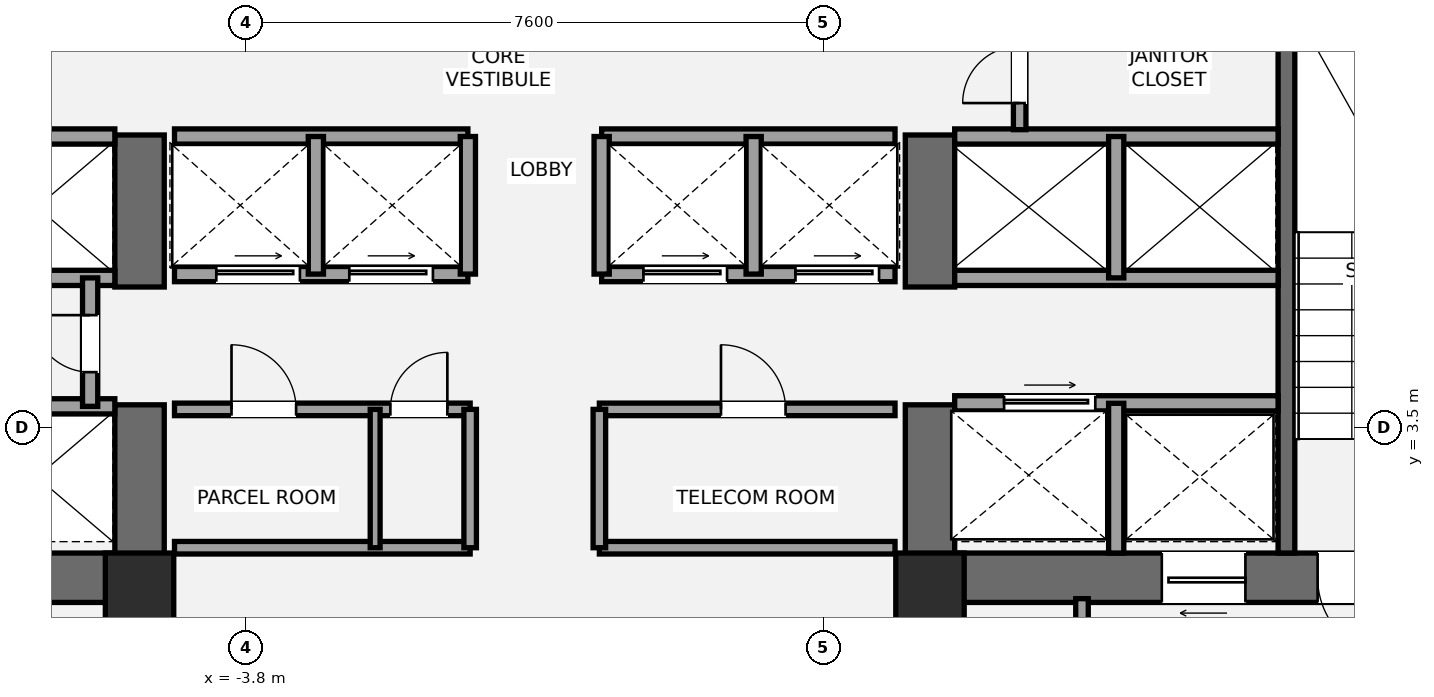
"""IFC4 building model, lengths in metres.
Left out: names, types, materials, properties, quantities, classifications, styles, units other than length and angle.
Written with IfcOpenShell. Run it as: python <this file> out.ifc"""

import sys

from ifc_helpers import new_model, si_unit, direction, frame, frame_2d, origin, origin_2d, place, context, subcontext, project, spatial, rectangle, extrude, element, fill, save


model = new_model("IFC4")
c1 = context("Model", 3, precision=1e-05, world=origin(), true_north=direction((0.0, 1.0)))
c2 = subcontext(c1, "Body", "Model", "MODEL_VIEW")
j1 = project(units=[si_unit("LENGTHUNIT", "METRE"), si_unit("PLANEANGLEUNIT", "RADIAN")], contexts=[c1])
p1 = place(None, origin())
s1 = spatial("IfcSite", under=j1, at=p1, CompositionType="ELEMENT")
p2 = place(p1, origin())
s2 = spatial("IfcBuilding", under=s1, at=p2, CompositionType="ELEMENT")
p3 = place(p2, frame((0.0, 0.0, 188.6)))
s3 = spatial("IfcBuildingStorey", under=s2, at=p3, CompositionType="ELEMENT", Elevation=188.6)
p4 = place(p3, frame((-4.875, 1.525, 0.0), z_axis=(0.0, 0.0, 1.0), x_axis=(-1.0, 0.0, 0.0)))
e1 = element("IfcWall", 1, at=p4, inside=s3, PredefinedType="SHEAR", context=c2, shape_type="SweptSolid", body=[
    extrude(rectangle(XDim=8.925, YDim=0.65, at=frame_2d((4.462, 0.0))), origin(), (0.0, 0.0, 1.0), 3.2),
])
p5 = place(p4, frame((5.425, 0.0, 0.0)))
e2 = element("IfcOpeningElement", 2, at=p5, cuts=e1, PredefinedType="OPENING", context=c2, shape_type="SweptSolid", body=[
    extrude(rectangle(XDim=1.05, YDim=2.15, at=frame_2d((0.525, 1.075))), frame((0.0, 0.335, 0.0), z_axis=(0.0, -1.0, 0.0), x_axis=(1.0, 0.0, 0.0)), (0.0, 0.0, 1.0), 0.67),
])
p6 = place(p4, frame((3.755, 0.0, 0.0)))
e3 = element("IfcOpeningElement", 3, at=p6, cuts=e1, PredefinedType="OPENING", context=c2, shape_type="SweptSolid", body=[
    extrude(rectangle(XDim=1.1, YDim=2.2, at=frame_2d((0.55, 1.1))), frame((0.0, 0.335, 0.0), z_axis=(0.0, -1.0, 0.0), x_axis=(1.0, 0.0, 0.0)), (0.0, 0.0, 1.0), 0.67),
])
p7 = place(p3, frame((-5.2, 1.2, 0.0), z_axis=(0.0, 0.0, 1.0), x_axis=(0.0, 1.0, 0.0)))
e4 = element("IfcWall", 4, at=p7, inside=s3, PredefinedType="SHEAR", context=c2, shape_type="SweptSolid", body=[
    extrude(rectangle(XDim=2.6, YDim=0.65, at=frame_2d((1.3, 0.0))), origin(), (0.0, 0.0, 1.0), 3.2),
])
p8 = place(p3, frame((-5.2, 5.35, 0.0), z_axis=(0.0, 0.0, 1.0), x_axis=(0.0, 1.0, 0.0)))
e5 = element("IfcWall", 5, at=p8, inside=s3, PredefinedType="SHEAR", context=c2, shape_type="SweptSolid", body=[
    extrude(rectangle(XDim=2.0, YDim=0.65, at=frame_2d((1.0, 0.0))), origin(), (0.0, 0.0, 1.0), 3.2),
])
p9 = place(p3, frame((13.8, 1.525, 0.0), z_axis=(0.0, 0.0, 1.0), x_axis=(-1.0, 0.0, 0.0)))
e6 = element("IfcWall", 6, at=p9, inside=s3, PredefinedType="SHEAR", context=c2, shape_type="SweptSolid", body=[
    extrude(rectangle(XDim=8.925, YDim=0.65, at=frame_2d((4.462, 0.0))), origin(), (0.0, 0.0, 1.0), 3.2),
])
p10 = place(p9, frame((2.45, 0.0, 0.0)))
e7 = element("IfcOpeningElement", 7, at=p10, cuts=e6, PredefinedType="OPENING", context=c2, shape_type="SweptSolid", body=[
    extrude(rectangle(XDim=1.05, YDim=2.15, at=frame_2d((0.525, 1.075))), frame((0.0, 0.335, 0.0), z_axis=(0.0, -1.0, 0.0), x_axis=(1.0, 0.0, 0.0)), (0.0, 0.0, 1.0), 0.67),
])
p11 = place(p9, frame((4.45, 0.0, 0.0)))
e8 = element("IfcOpeningElement", 8, at=p11, cuts=e6, PredefinedType="OPENING", context=c2, shape_type="SweptSolid", body=[
    extrude(rectangle(XDim=1.1, YDim=2.2, at=frame_2d((0.55, 1.1))), frame((0.0, 0.335, 0.0), z_axis=(0.0, -1.0, 0.0), x_axis=(1.0, 0.0, 0.0)), (0.0, 0.0, 1.0), 0.67),
])
p12 = place(p3, frame((5.2, 1.2, 0.0), z_axis=(0.0, 0.0, 1.0), x_axis=(0.0, 1.0, 0.0)))
e9 = element("IfcWall", 9, at=p12, inside=s3, PredefinedType="SHEAR", context=c2, shape_type="SweptSolid", body=[
    extrude(rectangle(XDim=2.6, YDim=0.65, at=frame_2d((1.3, 0.0))), origin(), (0.0, 0.0, 1.0), 3.2),
])
p13 = place(p3, frame((5.2, 5.35, 0.0), z_axis=(0.0, 0.0, 1.0), x_axis=(0.0, 1.0, 0.0)))
e10 = element("IfcWall", 10, at=p13, inside=s3, PredefinedType="SHEAR", context=c2, shape_type="SweptSolid", body=[
    extrude(rectangle(XDim=2.0, YDim=0.65, at=frame_2d((1.0, 0.0))), origin(), (0.0, 0.0, 1.0), 3.2),
])
p14 = place(p3, frame((9.89, 1.85, 0.0), z_axis=(0.0, 0.0, 1.0), x_axis=(0.0, 1.0, 0.0)))
e11 = element("IfcWall", 11, at=p14, inside=s3, PredefinedType="SHEAR", context=c2, shape_type="SweptSolid", body=[
    extrude(rectangle(XDim=7.15, YDim=0.22, at=frame_2d((3.575, 0.0))), origin(), (0.0, 0.0, 1.0), 3.2),
])
for number, where, z_axis, x_axis in (
    (12, (-5.2, 1.4, 0.0), (0.0, 0.0, 1.0), (1.0, 0.0, 0.0)),
    (13, (5.2, 1.4, 0.0), (0.0, 0.0, 1.0), (1.0, 0.0, 0.0)),
):
    element("IfcColumn", number, at=place(p3, frame(where, z_axis=z_axis, x_axis=x_axis)), inside=s3, PredefinedType="COLUMN", context=c2, shape_type="SweptSolid", body=[
        extrude(rectangle(XDim=0.9, YDim=0.9, at=origin_2d()), origin(), (0.0, 0.0, 1.0), 3.2),
    ])
p15 = place(p3, frame((-4.95, -2.15, 0.0), z_axis=(0.0, 0.0, 1.0), x_axis=(0.0, 1.0, 0.0)))
e14 = element("IfcWall", 14, at=p15, inside=s3, PredefinedType="SOLIDWALL", context=c2, shape_type="SweptSolid", body=[
    extrude(rectangle(XDim=3.4, YDim=0.2, at=frame_2d((1.7, 0.0))), origin(), (0.0, 0.0, 1.0), 2.473),
])
p16 = place(p15, frame((0.95, 0.0, 0.0)))
e15 = element("IfcOpeningElement", 15, at=p16, cuts=e14, PredefinedType="OPENING", context=c2, shape_type="SweptSolid", body=[
    extrude(rectangle(XDim=0.75, YDim=2.1, at=frame_2d((0.375, 1.05))), frame((0.0, 0.11, 0.0), z_axis=(0.0, -1.0, 0.0), x_axis=(1.0, 0.0, 0.0)), (0.0, 0.0, 1.0), 0.22),
])
p17 = place(p3, frame((7.2, -2.15, 0.0), z_axis=(0.0, 0.0, 1.0), x_axis=(0.0, 1.0, 0.0)))
e16 = element("IfcWall", 16, at=p17, inside=s3, PredefinedType="PARTITIONING", context=c2, shape_type="SweptSolid", body=[
    extrude(rectangle(XDim=3.4, YDim=0.165, at=frame_2d((1.7, 0.0))), origin(), (0.0, 0.0, 1.0), 2.473),
])
p18 = place(p3, frame((4.95, -2.15, 0.0), z_axis=(0.0, 0.0, 1.0), x_axis=(0.0, 1.0, 0.0)))
e17 = element("IfcWall", 17, at=p18, inside=s3, PredefinedType="SOLIDWALL", context=c2, shape_type="SweptSolid", body=[
    extrude(rectangle(XDim=3.4, YDim=0.2, at=frame_2d((1.7, 0.0))), origin(), (0.0, 0.0, 1.0), 2.473),
])
p19 = place(p18, frame((0.95, 0.0, 0.0)))
e18 = element("IfcOpeningElement", 18, at=p19, cuts=e17, PredefinedType="OPENING", context=c2, shape_type="SweptSolid", body=[
    extrude(rectangle(XDim=0.75, YDim=2.1, at=frame_2d((0.375, 1.05))), frame((0.0, 0.11, 0.0), z_axis=(0.0, -1.0, 0.0), x_axis=(1.0, 0.0, 0.0)), (0.0, 0.0, 1.0), 0.22),
])
for number, where, z_axis, x_axis in (
    (19, (-9.78, 3.78, 0.0), (0.0, 0.0, 1.0), (1.0, 0.0, 0.0)),
    (20, (-9.78, 5.47, 0.0), (0.0, 0.0, 1.0), (1.0, 0.0, 0.0)),
    (21, (-9.78, 7.33, 0.0), (0.0, 0.0, 1.0), (1.0, 0.0, 0.0)),
):
    element("IfcWall", number, at=place(p3, frame(where, z_axis=z_axis, x_axis=x_axis)), inside=s3, PredefinedType="SOLIDWALL", context=c2, shape_type="SweptSolid", body=[
        extrude(rectangle(XDim=4.255, YDim=0.2, at=frame_2d((2.127, 0.0))), origin(), (0.0, 0.0, 1.0), 3.02),
    ])
p20 = place(p3, frame((-5.85, 3.78, 0.0), z_axis=(0.0, 0.0, 1.0), x_axis=(0.0, 1.0, 0.0)))
e22 = element("IfcWall", 22, at=p20, inside=s3, PredefinedType="SOLIDWALL", context=c2, shape_type="SweptSolid", body=[
    extrude(rectangle(XDim=1.69, YDim=0.2, at=frame_2d((0.845, 0.0))), origin(), (0.0, 0.0, 1.0), 3.02),
])
p21 = place(p20, frame((0.45, 0.0, 0.0)))
e23 = element("IfcOpeningElement", 23, at=p21, cuts=e22, PredefinedType="OPENING", context=c2, shape_type="SweptSolid", body=[
    extrude(rectangle(XDim=0.75, YDim=2.1, at=frame_2d((0.375, 1.05))), frame((0.0, 0.11, 0.0), z_axis=(0.0, -1.0, 0.0), x_axis=(1.0, 0.0, 0.0)), (0.0, 0.0, 1.0), 0.22),
])
p22 = place(p3, frame((5.525, 3.82, 0.0), z_axis=(0.0, 0.0, 1.0), x_axis=(1.0, 0.0, 0.0)))
e24 = element("IfcWall", 24, at=p22, inside=s3, PredefinedType="SOLIDWALL", context=c2, shape_type="SweptSolid", body=[
    extrude(rectangle(XDim=4.255, YDim=0.2, at=frame_2d((2.127, 0.0))), origin(), (0.0, 0.0, 1.0), 3.02),
])
p23 = place(p22, frame((0.65, 0.0, 0.0)))
e25 = element("IfcOpeningElement", 25, at=p23, cuts=e24, PredefinedType="OPENING", context=c2, shape_type="SweptSolid", body=[
    extrude(rectangle(XDim=1.2, YDim=2.2, at=frame_2d((0.6, 1.1))), frame((0.0, 0.11, 0.0), z_axis=(0.0, -1.0, 0.0), x_axis=(1.0, 0.0, 0.0)), (0.0, 0.0, 1.0), 0.22),
])
p24 = place(p3, frame((7.65, 1.85, 0.0), z_axis=(0.0, 0.0, 1.0), x_axis=(0.0, 1.0, 0.0)))
e26 = element("IfcWall", 26, at=p24, inside=s3, PredefinedType="SOLIDWALL", context=c2, shape_type="SweptSolid", body=[
    extrude(rectangle(XDim=1.97, YDim=0.2, at=frame_2d((0.985, 0.0))), origin(), (0.0, 0.0, 1.0), 3.02),
])
for number, where, z_axis, x_axis in (
    (27, (5.525, 5.47, 0.0), (0.0, 0.0, 1.0), (1.0, 0.0, 0.0)),
    (28, (5.525, 7.33, 0.0), (0.0, 0.0, 1.0), (1.0, 0.0, 0.0)),
):
    element("IfcWall", number, at=place(p3, frame(where, z_axis=z_axis, x_axis=x_axis)), inside=s3, PredefinedType="SOLIDWALL", context=c2, shape_type="SweptSolid", body=[
        extrude(rectangle(XDim=4.255, YDim=0.2, at=frame_2d((2.127, 0.0))), origin(), (0.0, 0.0, 1.0), 3.02),
    ])
p25 = place(p3, frame((7.65, 5.47, 0.0), z_axis=(0.0, 0.0, 1.0), x_axis=(0.0, 1.0, 0.0)))
e29 = element("IfcWall", 29, at=p25, inside=s3, PredefinedType="SOLIDWALL", context=c2, shape_type="SweptSolid", body=[
    extrude(rectangle(XDim=1.86, YDim=0.2, at=frame_2d((0.93, 0.0))), origin(), (0.0, 0.0, 1.0), 3.02),
])
p26 = place(p3, frame((-4.74, 1.92, 0.0), z_axis=(0.0, 0.0, 1.0), x_axis=(1.0, 0.0, 0.0)))
e30 = element("IfcWall", 30, at=p26, inside=s3, PredefinedType="PARTITIONING", context=c2, shape_type="SweptSolid", body=[
    extrude(rectangle(XDim=3.89, YDim=0.165, at=frame_2d((1.945, 0.0))), origin(), (0.0, 0.0, 1.0), 2.16),
])
p27 = place(p3, frame((-4.74, 3.74, 0.0), z_axis=(0.0, 0.0, 1.0), x_axis=(1.0, 0.0, 0.0)))
e31 = element("IfcWall", 31, at=p27, inside=s3, PredefinedType="PARTITIONING", context=c2, shape_type="SweptSolid", body=[
    extrude(rectangle(XDim=3.89, YDim=0.165, at=frame_2d((1.945, 0.0))), origin(), (0.0, 0.0, 1.0), 3.02),
])
p28 = place(p27, frame((0.75, 0.0, 0.0)))
e32 = element("IfcOpeningElement", 32, at=p28, cuts=e31, PredefinedType="OPENING", context=c2, shape_type="SweptSolid", body=[
    extrude(rectangle(XDim=0.85, YDim=2.1, at=frame_2d((0.425, 1.05))), frame((0.0, 0.093, 0.0), z_axis=(0.0, -1.0, 0.0), x_axis=(1.0, 0.0, 0.0)), (0.0, 0.0, 1.0), 0.185),
])
p29 = place(p27, frame((2.84, 0.0, 0.0)))
e33 = element("IfcOpeningElement", 33, at=p29, cuts=e31, PredefinedType="OPENING", context=c2, shape_type="SweptSolid", body=[
    extrude(rectangle(XDim=0.75, YDim=2.1, at=frame_2d((0.375, 1.05))), frame((0.0, 0.093, 0.0), z_axis=(0.0, -1.0, 0.0), x_axis=(1.0, 0.0, 0.0)), (0.0, 0.0, 1.0), 0.185),
])
p30 = place(p3, frame((-0.85, 1.92, 0.0), z_axis=(0.0, 0.0, 1.0), x_axis=(0.0, 1.0, 0.0)))
e34 = element("IfcWall", 34, at=p30, inside=s3, PredefinedType="PARTITIONING", context=c2, shape_type="SweptSolid", body=[
    extrude(rectangle(XDim=1.82, YDim=0.165, at=frame_2d((0.91, 0.0))), origin(), (0.0, 0.0, 1.0), 3.02),
])
p31 = place(p3, frame((0.85, 1.92, 0.0), z_axis=(0.0, 0.0, 1.0), x_axis=(1.0, 0.0, 0.0)))
e35 = element("IfcWall", 35, at=p31, inside=s3, PredefinedType="PARTITIONING", context=c2, shape_type="SweptSolid", body=[
    extrude(rectangle(XDim=3.89, YDim=0.165, at=frame_2d((1.945, 0.0))), origin(), (0.0, 0.0, 1.0), 2.16),
])
p32 = place(p3, frame((0.85, 3.74, 0.0), z_axis=(0.0, 0.0, 1.0), x_axis=(1.0, 0.0, 0.0)))
e36 = element("IfcWall", 36, at=p32, inside=s3, PredefinedType="PARTITIONING", context=c2, shape_type="SweptSolid", body=[
    extrude(rectangle(XDim=3.89, YDim=0.165, at=frame_2d((1.945, 0.0))), origin(), (0.0, 0.0, 1.0), 3.02),
])
p33 = place(p32, frame((1.6, 0.0, 0.0)))
e37 = element("IfcOpeningElement", 37, at=p33, cuts=e36, PredefinedType="OPENING", context=c2, shape_type="SweptSolid", body=[
    extrude(rectangle(XDim=0.85, YDim=2.1, at=frame_2d((0.425, 1.05))), frame((0.0, 0.093, 0.0), z_axis=(0.0, -1.0, 0.0), x_axis=(1.0, 0.0, 0.0)), (0.0, 0.0, 1.0), 0.185),
])
p34 = place(p3, frame((0.85, 1.92, 0.0), z_axis=(0.0, 0.0, 1.0), x_axis=(0.0, 1.0, 0.0)))
e38 = element("IfcWall", 38, at=p34, inside=s3, PredefinedType="PARTITIONING", context=c2, shape_type="SweptSolid", body=[
    extrude(rectangle(XDim=1.82, YDim=0.165, at=frame_2d((0.91, 0.0))), origin(), (0.0, 0.0, 1.0), 3.02),
])
p35 = place(p3, frame((-2.1, 1.92, 0.0), z_axis=(0.0, 0.0, 1.0), x_axis=(0.0, 1.0, 0.0)))
e39 = element("IfcWall", 39, at=p35, inside=s3, PredefinedType="PARTITIONING", context=c2, shape_type="SweptSolid", body=[
    extrude(rectangle(XDim=1.82, YDim=0.13, at=frame_2d((0.91, 0.0))), origin(), (0.0, 0.0, 1.0), 3.02),
])
p36 = place(p3, frame((-4.74, 5.52, 0.0), z_axis=(0.0, 0.0, 1.0), x_axis=(1.0, 0.0, 0.0)))
e40 = element("IfcWall", 40, at=p36, inside=s3, PredefinedType="SOLIDWALL", context=c2, shape_type="SweptSolid", body=[
    extrude(rectangle(XDim=3.86, YDim=0.2, at=frame_2d((1.93, 0.0))), origin(), (0.0, 0.0, 1.0), 3.02),
])
p37 = place(p36, frame((0.55, 0.0, 0.0)))
e41 = element("IfcOpeningElement", 41, at=p37, cuts=e40, PredefinedType="OPENING", context=c2, shape_type="SweptSolid", body=[
    extrude(rectangle(XDim=1.1, YDim=2.2, at=frame_2d((0.55, 1.1))), frame((0.0, 0.11, 0.0), z_axis=(0.0, -1.0, 0.0), x_axis=(1.0, 0.0, 0.0)), (0.0, 0.0, 1.0), 0.22),
])
p38 = place(p36, frame((2.3, 0.0, 0.0)))
e42 = element("IfcOpeningElement", 42, at=p38, cuts=e40, PredefinedType="OPENING", context=c2, shape_type="SweptSolid", body=[
    extrude(rectangle(XDim=1.1, YDim=2.2, at=frame_2d((0.55, 1.1))), frame((0.0, 0.11, 0.0), z_axis=(0.0, -1.0, 0.0), x_axis=(1.0, 0.0, 0.0)), (0.0, 0.0, 1.0), 0.22),
])
p39 = place(p3, frame((0.88, 5.52, 0.0), z_axis=(0.0, 0.0, 1.0), x_axis=(1.0, 0.0, 0.0)))
e43 = element("IfcWall", 43, at=p39, inside=s3, PredefinedType="SOLIDWALL", context=c2, shape_type="SweptSolid", body=[
    extrude(rectangle(XDim=3.86, YDim=0.2, at=frame_2d((1.93, 0.0))), origin(), (0.0, 0.0, 1.0), 3.02),
])
p40 = place(p39, frame((0.55, 0.0, 0.0)))
e44 = element("IfcOpeningElement", 44, at=p40, cuts=e43, PredefinedType="OPENING", context=c2, shape_type="SweptSolid", body=[
    extrude(rectangle(XDim=1.1, YDim=2.2, at=frame_2d((0.55, 1.1))), frame((0.0, 0.11, 0.0), z_axis=(0.0, -1.0, 0.0), x_axis=(1.0, 0.0, 0.0)), (0.0, 0.0, 1.0), 0.22),
])
p41 = place(p39, frame((2.55, 0.0, 0.0)))
e45 = element("IfcOpeningElement", 45, at=p41, cuts=e43, PredefinedType="OPENING", context=c2, shape_type="SweptSolid", body=[
    extrude(rectangle(XDim=1.1, YDim=2.2, at=frame_2d((0.55, 1.1))), frame((0.0, 0.11, 0.0), z_axis=(0.0, -1.0, 0.0), x_axis=(1.0, 0.0, 0.0)), (0.0, 0.0, 1.0), 0.22),
])
for number, where, z_axis, x_axis in (
    (46, (-4.74, 7.33, 0.0), (0.0, 0.0, 1.0), (1.0, 0.0, 0.0)),
    (47, (0.88, 7.33, 0.0), (0.0, 0.0, 1.0), (1.0, 0.0, 0.0)),
):
    element("IfcWall", number, at=place(p3, frame(where, z_axis=z_axis, x_axis=x_axis)), inside=s3, PredefinedType="SOLIDWALL", context=c2, shape_type="SweptSolid", body=[
        extrude(rectangle(XDim=3.86, YDim=0.2, at=frame_2d((1.93, 0.0))), origin(), (0.0, 0.0, 1.0), 3.02),
    ])
for number, where, z_axis, x_axis in (
    (48, (-2.88, 5.52, 0.0), (0.0, 0.0, 1.0), (0.0, 1.0, 0.0)),
    (49, (2.88, 5.52, 0.0), (0.0, 0.0, 1.0), (0.0, 1.0, 0.0)),
    (50, (-0.88, 5.52, 0.0), (0.0, 0.0, 1.0), (0.0, 1.0, 0.0)),
    (51, (0.88, 5.52, 0.0), (0.0, 0.0, 1.0), (0.0, 1.0, 0.0)),
):
    element("IfcWall", number, at=place(p3, frame(where, z_axis=z_axis, x_axis=x_axis)), inside=s3, PredefinedType="SOLIDWALL", context=c2, shape_type="SweptSolid", body=[
        extrude(rectangle(XDim=1.81, YDim=0.2, at=frame_2d((0.905, 0.0))), origin(), (0.0, 0.0, 1.0), 3.02),
    ])
p42 = place(p3, frame((6.38, 7.42, 0.0), z_axis=(0.0, 0.0, 1.0), x_axis=(0.0, 1.0, 0.0)))
e52 = element("IfcWall", 52, at=p42, inside=s3, PredefinedType="PARTITIONING", context=c2, shape_type="SweptSolid", body=[
    extrude(rectangle(XDim=1.58, YDim=0.165, at=frame_2d((0.79, 0.0))), origin(), (0.0, 0.0, 1.0), 3.02),
])
p43 = place(p42, frame((0.35, 0.0, 0.0)))
e53 = element("IfcOpeningElement", 53, at=p43, cuts=e52, PredefinedType="OPENING", context=c2, shape_type="SweptSolid", body=[
    extrude(rectangle(XDim=0.75, YDim=2.1, at=frame_2d((0.375, 1.05))), frame((0.0, 0.093, 0.0), z_axis=(0.0, -1.0, 0.0), x_axis=(1.0, 0.0, 0.0)), (0.0, 0.0, 1.0), 0.185),
])
p44 = place(p10, origin())
e54 = element("IfcDoor", 54, at=p44, inside=s3, OperationType="SINGLE_SWING_LEFT", PredefinedType="DOOR", context=c2, shape_type="SweptSolid", body=[
    extrude(rectangle(XDim=1.05, YDim=2.15, at=frame_2d((0.525, 1.075))), frame((0.0, 0.025, 0.0), z_axis=(0.0, -1.0, 0.0), x_axis=(1.0, 0.0, 0.0)), (0.0, 0.0, 1.0), 0.05),
])
fill(e7, e54)
p45 = place(p21, origin())
e55 = element("IfcDoor", 55, at=p45, inside=s3, OperationType="SINGLE_SWING_RIGHT", PredefinedType="DOOR", context=c2, shape_type="SweptSolid", body=[
    extrude(rectangle(XDim=0.75, YDim=2.1, at=frame_2d((0.375, 1.05))), frame((0.0, 0.025, 0.0), z_axis=(0.0, -1.0, 0.0), x_axis=(1.0, 0.0, 0.0)), (0.0, 0.0, 1.0), 0.05),
])
fill(e23, e55)
p46 = place(p11, origin())
e56 = element("IfcDoor", 56, at=p46, inside=s3, OperationType="SLIDING_TO_LEFT", PredefinedType="DOOR", context=c2, shape_type="SweptSolid", body=[
    extrude(rectangle(XDim=1.1, YDim=2.2, at=frame_2d((0.55, 1.1))), frame((0.0, 0.025, 0.0), z_axis=(0.0, -1.0, 0.0), x_axis=(1.0, 0.0, 0.0)), (0.0, 0.0, 1.0), 0.05),
])
fill(e8, e56)
p47 = place(p23, origin())
e57 = element("IfcDoor", 57, at=p47, inside=s3, OperationType="SLIDING_TO_RIGHT", PredefinedType="DOOR", context=c2, shape_type="SweptSolid", body=[
    extrude(rectangle(XDim=1.2, YDim=2.2, at=frame_2d((0.6, 1.1))), frame((0.0, 0.025, 0.0), z_axis=(0.0, -1.0, 0.0), x_axis=(1.0, 0.0, 0.0)), (0.0, 0.0, 1.0), 0.05),
])
fill(e25, e57)
p48 = place(p28, origin())
e58 = element("IfcDoor", 58, at=p48, inside=s3, OperationType="SINGLE_SWING_LEFT", PredefinedType="DOOR", context=c2, shape_type="SweptSolid", body=[
    extrude(rectangle(XDim=0.85, YDim=2.1, at=frame_2d((0.425, 1.05))), frame((0.0, 0.025, 0.0), z_axis=(0.0, -1.0, 0.0), x_axis=(1.0, 0.0, 0.0)), (0.0, 0.0, 1.0), 0.05),
])
fill(e32, e58)
p49 = place(p29, origin())
e59 = element("IfcDoor", 59, at=p49, inside=s3, OperationType="SINGLE_SWING_RIGHT", PredefinedType="DOOR", context=c2, shape_type="SweptSolid", body=[
    extrude(rectangle(XDim=0.75, YDim=2.1, at=frame_2d((0.375, 1.05))), frame((0.0, 0.025, 0.0), z_axis=(0.0, -1.0, 0.0), x_axis=(1.0, 0.0, 0.0)), (0.0, 0.0, 1.0), 0.05),
])
fill(e33, e59)
p50 = place(p33, origin())
e60 = element("IfcDoor", 60, at=p50, inside=s3, OperationType="SINGLE_SWING_LEFT", PredefinedType="DOOR", context=c2, shape_type="SweptSolid", body=[
    extrude(rectangle(XDim=0.85, YDim=2.1, at=frame_2d((0.425, 1.05))), frame((0.0, 0.025, 0.0), z_axis=(0.0, -1.0, 0.0), x_axis=(1.0, 0.0, 0.0)), (0.0, 0.0, 1.0), 0.05),
])
fill(e37, e60)
p51 = place(p37, origin())
e61 = element("IfcDoor", 61, at=p51, inside=s3, OperationType="SLIDING_TO_LEFT", PredefinedType="DOOR", context=c2, shape_type="SweptSolid", body=[
    extrude(rectangle(XDim=1.1, YDim=2.2, at=frame_2d((0.55, 1.1))), frame((0.0, 0.025, 0.0), z_axis=(0.0, -1.0, 0.0), x_axis=(1.0, 0.0, 0.0)), (0.0, 0.0, 1.0), 0.05),
])
fill(e41, e61)
p52 = place(p38, origin())
e62 = element("IfcDoor", 62, at=p52, inside=s3, OperationType="SLIDING_TO_LEFT", PredefinedType="DOOR", context=c2, shape_type="SweptSolid", body=[
    extrude(rectangle(XDim=1.1, YDim=2.2, at=frame_2d((0.55, 1.1))), frame((0.0, 0.025, 0.0), z_axis=(0.0, -1.0, 0.0), x_axis=(1.0, 0.0, 0.0)), (0.0, 0.0, 1.0), 0.05),
])
fill(e42, e62)
p53 = place(p40, origin())
e63 = element("IfcDoor", 63, at=p53, inside=s3, OperationType="SLIDING_TO_LEFT", PredefinedType="DOOR", context=c2, shape_type="SweptSolid", body=[
    extrude(rectangle(XDim=1.1, YDim=2.2, at=frame_2d((0.55, 1.1))), frame((0.0, 0.025, 0.0), z_axis=(0.0, -1.0, 0.0), x_axis=(1.0, 0.0, 0.0)), (0.0, 0.0, 1.0), 0.05),
])
fill(e44, e63)
p54 = place(p41, origin())
e64 = element("IfcDoor", 64, at=p54, inside=s3, OperationType="SLIDING_TO_LEFT", PredefinedType="DOOR", context=c2, shape_type="SweptSolid", body=[
    extrude(rectangle(XDim=1.1, YDim=2.2, at=frame_2d((0.55, 1.1))), frame((0.0, 0.025, 0.0), z_axis=(0.0, -1.0, 0.0), x_axis=(1.0, 0.0, 0.0)), (0.0, 0.0, 1.0), 0.05),
])
fill(e45, e64)
p55 = place(p43, origin())
e65 = element("IfcDoor", 65, at=p55, inside=s3, OperationType="SINGLE_SWING_LEFT", PredefinedType="DOOR", context=c2, shape_type="SweptSolid", body=[
    extrude(rectangle(XDim=0.75, YDim=2.1, at=frame_2d((0.375, 1.05))), frame((0.0, 0.025, 0.0), z_axis=(0.0, -1.0, 0.0), x_axis=(1.0, 0.0, 0.0)), (0.0, 0.0, 1.0), 0.05),
])
fill(e53, e65)
save(model, sys.argv[1])
